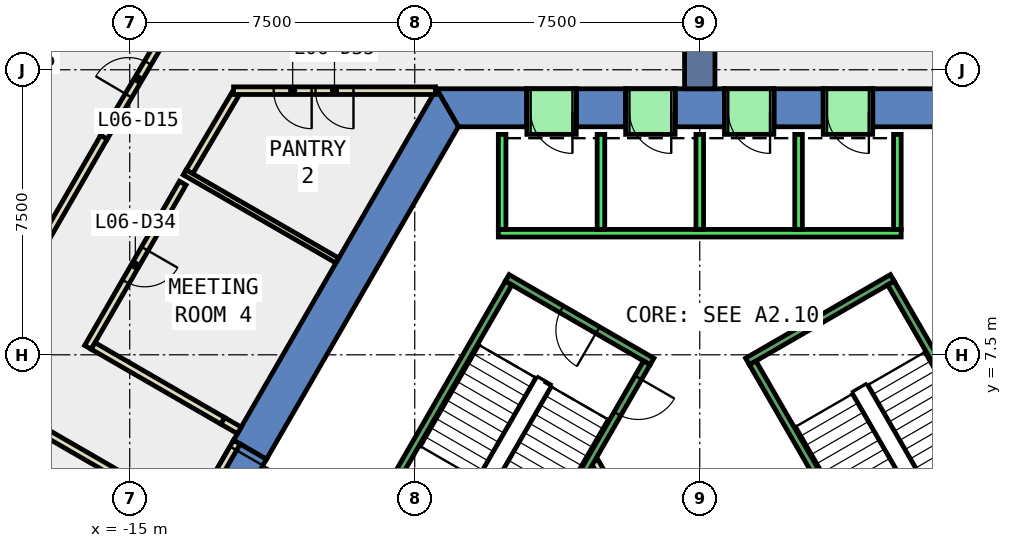
"""IFC4 building model, lengths in metres.
Left out: names, types, materials, properties, quantities, classifications, styles, units other than length and angle.
Written with IfcOpenShell. Run it as: python <this file> out.ifc"""

import sys

from ifc_helpers import new_model, si_unit, direction, frame, frame_2d, origin, place, context, subcontext, project, spatial, polyline, rectangle, outline, extrude, element, fill, save


model = new_model("IFC4")
c1 = context("Model", 3, precision=1e-05, world=origin(), true_north=direction((0.0, 1.0)))
c2 = subcontext(c1, "Body", "Model", "MODEL_VIEW")
j1 = project(units=[si_unit("LENGTHUNIT", "METRE"), si_unit("PLANEANGLEUNIT", "RADIAN")], contexts=[c1])
p1 = place(None, origin())
s1 = spatial("IfcSite", under=j1, at=p1, CompositionType="ELEMENT")
p2 = place(p1, origin())
s2 = spatial("IfcBuilding", under=s1, at=p2, CompositionType="ELEMENT")
p3 = place(p2, frame((0.0, 0.0, 35.0)))
s3 = spatial("IfcBuildingStorey", under=s2, at=p3, CompositionType="ELEMENT", Elevation=35.0)
p4 = place(p3, frame((0.0, 0.0, -0.6)))
e1 = element("IfcWall", 1, at=p4, inside=s3, PredefinedType="SHEAR", context=c2, shape_type="SweptSolid", body=[
    extrude(outline(polyline([(4.55, 14.5), (4.55, 13.5), (6.351, 13.5), (6.928, 14.5), (4.55, 14.5)])), origin(), (0.0, 0.0, 1.0), 4.4),
])
p5 = place(p3, frame((0.0, 0.0, -0.6)))
e2 = element("IfcWall", 2, at=p5, inside=s3, PredefinedType="SHEAR", context=c2, shape_type="SweptSolid", body=[
    extrude(outline(polyline([(1.95, 14.5), (1.95, 13.5), (3.25, 13.5), (3.25, 14.5), (1.95, 14.5)])), origin(), (0.0, 0.0, 1.0), 4.4),
])
p6 = place(p3, frame((0.0, 0.0, -0.6)))
e3 = element("IfcWall", 3, at=p6, inside=s3, PredefinedType="SHEAR", context=c2, shape_type="SweptSolid", body=[
    extrude(outline(polyline([(-0.65, 14.5), (-0.65, 13.5), (0.65, 13.5), (0.65, 14.5), (-0.65, 14.5)])), origin(), (0.0, 0.0, 1.0), 4.4),
])
p7 = place(p3, frame((0.0, 0.0, -0.6)))
e4 = element("IfcWall", 4, at=p7, inside=s3, PredefinedType="SHEAR", context=c2, shape_type="SweptSolid", body=[
    extrude(outline(polyline([(-3.25, 14.5), (-3.25, 13.5), (-1.95, 13.5), (-1.95, 14.5), (-3.25, 14.5)])), origin(), (0.0, 0.0, 1.0), 4.4),
])
p8 = place(p3, frame((0.0, 0.0, -0.6)))
e5 = element("IfcWall", 5, at=p8, inside=s3, PredefinedType="SHEAR", context=c2, shape_type="SweptSolid", body=[
    extrude(outline(polyline([(-4.55, 13.5), (-4.55, 14.5), (-6.928, 14.5), (-6.351, 13.5), (-4.55, 13.5)])), origin(), (0.0, 0.0, 1.0), 4.4),
])
p9 = place(p3, frame((0.0, 0.0, 3.6)))
e6 = element("IfcWall", 6, at=p9, inside=s3, PredefinedType="SHEAR", context=c2, shape_type="SweptSolid", body=[
    extrude(outline(polyline([(3.25, 14.5), (3.25, 13.5), (4.55, 13.5), (4.55, 14.5), (3.25, 14.5)])), origin(), (0.0, 0.0, 1.0), 0.2),
])
p10 = place(p3, frame((0.0, 0.0, 3.6)))
e7 = element("IfcWall", 7, at=p10, inside=s3, PredefinedType="SHEAR", context=c2, shape_type="SweptSolid", body=[
    extrude(outline(polyline([(0.65, 14.5), (0.65, 13.5), (1.95, 13.5), (1.95, 14.5), (0.65, 14.5)])), origin(), (0.0, 0.0, 1.0), 0.2),
])
p11 = place(p3, frame((0.0, 0.0, 3.6)))
e8 = element("IfcWall", 8, at=p11, inside=s3, PredefinedType="SHEAR", context=c2, shape_type="SweptSolid", body=[
    extrude(outline(polyline([(-1.95, 14.5), (-1.95, 13.5), (-0.65, 13.5), (-0.65, 14.5), (-1.95, 14.5)])), origin(), (0.0, 0.0, 1.0), 0.2),
])
p12 = place(p3, frame((0.0, 0.0, 3.6)))
e9 = element("IfcWall", 9, at=p12, inside=s3, PredefinedType="SHEAR", context=c2, shape_type="SweptSolid", body=[
    extrude(outline(polyline([(-4.55, 14.5), (-4.55, 13.5), (-3.25, 13.5), (-3.25, 14.5), (-4.55, 14.5)])), origin(), (0.0, 0.0, 1.0), 0.2),
])
p13 = place(p3, frame((0.0, 0.0, -0.6)))
e10 = element("IfcWall", 10, at=p13, inside=s3, PredefinedType="SHEAR", context=c2, shape_type="SweptSolid", body=[
    extrude(outline(polyline([(-12.267, 5.252), (-11.402, 4.752), (-6.351, 13.5), (-6.928, 14.5), (-12.267, 5.252)])), origin(), (0.0, 0.0, 1.0), 4.4),
])
p14 = place(p3, frame((0.0, 0.0, 3.6)))
e11 = element("IfcWall", 11, at=p14, inside=s3, PredefinedType="SHEAR", context=c2, shape_type="SweptSolid", body=[
    extrude(outline(polyline([(-13.267, 3.52), (-12.402, 3.02), (-11.402, 4.752), (-12.267, 5.252), (-13.267, 3.52)])), origin(), (0.0, 0.0, 1.0), 0.2),
])
p15 = place(p3, frame((0.0, 14.5, -0.6), z_axis=(0.0, 0.0, 1.0), x_axis=(0.0, 1.0, 0.0)))
e12 = element("IfcWall", 12, at=p15, inside=s3, PredefinedType="SHEAR", context=c2, shape_type="SweptSolid", body=[
    extrude(rectangle(XDim=9.0, YDim=0.8, at=frame_2d((4.5, 0.0))), origin(), (0.0, 0.0, 1.0), 4.4),
])
p16 = place(p3, frame((-13.606, 12.016, 0.0), z_axis=(0.0, 0.0, 1.0), x_axis=(-0.499992180995, -0.866029918042, 0.0)))
e13 = element("IfcWall", 13, at=p16, inside=s3, PredefinedType="PARTITIONING", context=c2, shape_type="SweptSolid", body=[
    extrude(rectangle(XDim=4.988, YDim=0.2, at=frame_2d((2.494, 0.0))), origin(), (0.0, 0.0, 1.0), 3.8),
])
p17 = place(p16, frame((1.994, 0.0, 0.0)))
e14 = element("IfcOpeningElement", 14, at=p17, cuts=e13, PredefinedType="OPENING", context=c2, shape_type="SweptSolid", body=[
    extrude(rectangle(XDim=1.0, YDim=2.1, at=frame_2d((0.5, 1.05))), frame((0.0, 0.11, 0.0), z_axis=(0.0, -1.0, 0.0), x_axis=(1.0, 0.0, 0.0)), (0.0, 0.0, 1.0), 0.22),
])
p18 = place(p3, frame((-15.963, 7.733, 0.0), z_axis=(0.0, 0.0, 1.0), x_axis=(0.865965832374, -0.500103166518, 0.0)))
e15 = element("IfcWall", 15, at=p18, inside=s3, PredefinedType="PARTITIONING", context=c2, shape_type="SweptSolid", body=[
    extrude(rectangle(XDim=3.941, YDim=0.2, at=frame_2d((1.971, 0.0))), origin(), (0.0, 0.0, 1.0), 3.8),
])
p19 = place(p3, frame((-12.218, 14.364, 0.0), z_axis=(0.0, 0.0, 1.0), x_axis=(-0.508767325294, -0.860904064756, 0.0)))
e16 = element("IfcWall", 16, at=p19, inside=s3, PredefinedType="PARTITIONING", context=c2, shape_type="SweptSolid", body=[
    extrude(rectangle(XDim=2.38, YDim=0.2, at=frame_2d((1.19, 0.0))), origin(), (0.0, 0.0, 1.0), 3.8),
])
p20 = place(p3, frame((-17.261, 5.48, 0.0), z_axis=(0.0, 0.0, 1.0), x_axis=(0.865949187497, -0.500131987253, 0.0)))
e17 = element("IfcWall", 17, at=p20, inside=s3, PredefinedType="PARTITIONING", context=c2, shape_type="SweptSolid", body=[
    extrude(rectangle(XDim=3.939, YDim=0.2, at=frame_2d((1.969, 0.0))), origin(), (0.0, 0.0, 1.0), 3.8),
])
p21 = place(p3, frame((-17.448, 10.16, 0.0), z_axis=(0.0, 0.0, 1.0), x_axis=(0.499951278228, 0.866053531485, 0.0)))
e18 = element("IfcWall", 18, at=p21, inside=s3, PredefinedType="PARTITIONING", context=c2, shape_type="SweptSolid", body=[
    extrude(rectangle(XDim=3.54, YDim=0.2, at=frame_2d((1.77, 0.0))), origin(), (0.0, 0.0, 1.0), 3.8),
])
p22 = place(p3, frame((-15.678, 13.226, 0.0), z_axis=(0.0, 0.0, 1.0), x_axis=(0.508613166028, 0.860995149431, 0.0)))
e19 = element("IfcWall", 19, at=p22, inside=s3, PredefinedType="PARTITIONING", context=c2, shape_type="SweptSolid", body=[
    extrude(rectangle(XDim=3.541, YDim=0.2, at=frame_2d((1.771, 0.0))), origin(), (0.0, 0.0, 1.0), 3.8),
])
p23 = place(p22, frame((1.271, 0.0, 0.0)))
e20 = element("IfcOpeningElement", 20, at=p23, cuts=e19, PredefinedType="OPENING", context=c2, shape_type="SweptSolid", body=[
    extrude(rectangle(XDim=1.0, YDim=2.1, at=frame_2d((0.5, 1.05))), frame((0.0, 0.11, 0.0), z_axis=(0.0, -1.0, 0.0), x_axis=(1.0, 0.0, 0.0)), (0.0, 0.0, 1.0), 0.22),
])
p24 = place(p3, frame((-13.554, 12.3, 0.0), z_axis=(0.0, 0.0, 1.0), x_axis=(0.866028685375, -0.499994316075, 0.0)))
e21 = element("IfcWall", 21, at=p24, inside=s3, PredefinedType="PARTITIONING", context=c2, shape_type="SweptSolid", body=[
    extrude(rectangle(XDim=4.638, YDim=0.15, at=frame_2d((2.319, 0.0))), origin(), (0.0, 0.0, 1.0), 3.8),
])
p25 = place(p3, frame((-6.957, 14.45, 0.0), z_axis=(0.0, 0.0, 1.0), x_axis=(-1.0, 0.0, 0.0)))
e22 = element("IfcWall", 22, at=p25, inside=s3, PredefinedType="PARTITIONING", context=c2, shape_type="SweptSolid", body=[
    extrude(rectangle(XDim=5.31, YDim=0.2, at=frame_2d((2.655, 0.0))), origin(), (0.0, 0.0, 1.0), 3.8),
])
p26 = place(p25, frame((2.155, 0.0, 0.0)))
e23 = element("IfcOpeningElement", 23, at=p26, cuts=e22, PredefinedType="OPENING", context=c2, shape_type="SweptSolid", body=[
    extrude(rectangle(XDim=1.0, YDim=2.1, at=frame_2d((0.5, 1.05))), frame((0.0, 0.11, 0.0), z_axis=(0.0, -1.0, 0.0), x_axis=(1.0, 0.0, 0.0)), (0.0, 0.0, 1.0), 0.22),
])
p27 = place(p25, frame((3.255, 0.0, 0.0)))
e24 = element("IfcOpeningElement", 24, at=p27, cuts=e22, PredefinedType="OPENING", context=c2, shape_type="SweptSolid", body=[
    extrude(rectangle(XDim=1.0, YDim=2.1, at=frame_2d((0.5, 1.05))), frame((0.0, 0.11, 0.0), z_axis=(0.0, -1.0, 0.0), x_axis=(1.0, 0.0, 0.0)), (0.0, 0.0, 1.0), 0.22),
])
p28 = place(p3, frame((-2.771, 4.7, 0.0), z_axis=(0.0, 0.0, 1.0), x_axis=(0.499969479948, -0.866043023828, 0.0)))
e25 = element("IfcWall", 25, at=p28, inside=s3, PredefinedType="PARTITIONING", context=c2, shape_type="SweptSolid", body=[
    extrude(rectangle(XDim=4.99, YDim=0.2, at=frame_2d((2.495, 0.0))), origin(), (0.0, 0.0, 1.0), 3.8),
])
p29 = place(p28, frame((1.945, 0.0, 0.0)))
e26 = element("IfcOpeningElement", 26, at=p29, cuts=e25, PredefinedType="OPENING", context=c2, shape_type="SweptSolid", body=[
    extrude(rectangle(XDim=1.0, YDim=2.1, at=frame_2d((0.5, 1.05))), frame((0.0, 0.11, 0.0), z_axis=(0.0, -1.0, 0.0), x_axis=(1.0, 0.0, 0.0)), (0.0, 0.0, 1.0), 0.22),
])
p30 = place(p3, frame((-12.18, 5.202, 0.0), z_axis=(0.0, 0.0, 1.0), x_axis=(-0.50002537861, -0.866010750942, 0.0)))
e27 = element("IfcWall", 27, at=p30, inside=s3, PredefinedType="PARTITIONING", context=c2, shape_type="SweptSolid", body=[
    extrude(rectangle(XDim=2.0, YDim=0.2, at=frame_2d((1.0, 0.0))), origin(), (0.0, 0.0, 1.0), 2.4),
])
p31 = place(p30, frame((0.19, 0.0, 0.0)))
e28 = element("IfcOpeningElement", 28, at=p31, cuts=e27, PredefinedType="OPENING", context=c2, shape_type="SweptSolid", body=[
    extrude(rectangle(XDim=1.8, YDim=2.1, at=frame_2d((0.9, 1.05))), frame((0.0, 0.11, 0.0), z_axis=(0.0, -1.0, 0.0), x_axis=(1.0, 0.0, 0.0)), (0.0, 0.0, 1.0), 0.22),
])
p32 = place(p3, frame((-12.55, 5.762, 0.0), z_axis=(0.0, 0.0, 1.0), x_axis=(0.866071776036, -0.499919672301, 0.0)))
e29 = element("IfcWall", 29, at=p32, inside=s3, PredefinedType="PARTITIONING", context=c2, shape_type="SweptSolid", body=[
    extrude(rectangle(XDim=0.5, YDim=0.2, at=frame_2d((0.25, 0.0))), origin(), (0.0, 0.0, 1.0), 2.4),
])
p33 = place(p3, frame((5.3, 10.7, 0.0), z_axis=(0.0, 0.0, 1.0), x_axis=(-1.0, 0.0, 0.0)))
e30 = element("IfcWall", 30, at=p33, inside=s3, PredefinedType="STANDARD", context=c2, shape_type="SweptSolid", body=[
    extrude(rectangle(XDim=10.6, YDim=0.2, at=frame_2d((5.3, 0.0))), origin(), (0.0, 0.0, 1.0), 3.8),
])
for number, where, z_axis, x_axis in (
    (31, (5.2, 10.8, 0.0), (0.0, 0.0, 1.0), (0.0, 1.0, 0.0)),
    (32, (2.6, 10.8, 0.0), (0.0, 0.0, 1.0), (0.0, 1.0, 0.0)),
    (33, (0.0, 10.8, 0.0), (0.0, 0.0, 1.0), (0.0, 1.0, 0.0)),
    (34, (-2.6, 10.8, 0.0), (0.0, 0.0, 1.0), (0.0, 1.0, 0.0)),
    (35, (-5.2, 10.8, 0.0), (0.0, 0.0, 1.0), (0.0, 1.0, 0.0)),
):
    element("IfcWall", number, at=place(p3, frame(where, z_axis=z_axis, x_axis=x_axis)), inside=s3, PredefinedType="STANDARD", context=c2, shape_type="SweptSolid", body=[
        extrude(rectangle(XDim=2.5, YDim=0.2, at=frame_2d((1.25, 0.0))), origin(), (0.0, 0.0, 1.0), 3.8),
    ])
p34 = place(p3, frame((4.55, 13.9, 0.0), z_axis=(0.0, 0.0, 1.0), x_axis=(-1.0, 0.0, 0.0)))
e36 = element("IfcWall", 36, at=p34, inside=s3, PredefinedType="STANDARD", context=c2, shape_type="SweptSolid", body=[
    extrude(rectangle(XDim=1.3, YDim=1.2, at=frame_2d((0.65, 0.0))), origin(), (0.0, 0.0, 1.0), 2.4),
])
p35 = place(p34, frame((0.1, 0.0, 0.0)))
e37 = element("IfcOpeningElement", 37, at=p35, cuts=e36, PredefinedType="OPENING", context=c2, shape_type="SweptSolid", body=[
    extrude(rectangle(XDim=1.1, YDim=2.3, at=frame_2d((0.55, 1.15))), frame((0.0, 0.61, 0.0), z_axis=(0.0, -1.0, 0.0), x_axis=(1.0, 0.0, 0.0)), (0.0, 0.0, 1.0), 1.22),
])
p36 = place(p3, frame((1.95, 13.9, 0.0), z_axis=(0.0, 0.0, 1.0), x_axis=(-1.0, 0.0, 0.0)))
e38 = element("IfcWall", 38, at=p36, inside=s3, PredefinedType="STANDARD", context=c2, shape_type="SweptSolid", body=[
    extrude(rectangle(XDim=1.3, YDim=1.2, at=frame_2d((0.65, 0.0))), origin(), (0.0, 0.0, 1.0), 2.4),
])
p37 = place(p36, frame((0.1, 0.0, 0.0)))
e39 = element("IfcOpeningElement", 39, at=p37, cuts=e38, PredefinedType="OPENING", context=c2, shape_type="SweptSolid", body=[
    extrude(rectangle(XDim=1.1, YDim=2.3, at=frame_2d((0.55, 1.15))), frame((0.0, 0.61, 0.0), z_axis=(0.0, -1.0, 0.0), x_axis=(1.0, 0.0, 0.0)), (0.0, 0.0, 1.0), 1.22),
])
p38 = place(p3, frame((-0.65, 13.9, 0.0), z_axis=(0.0, 0.0, 1.0), x_axis=(-1.0, 0.0, 0.0)))
e40 = element("IfcWall", 40, at=p38, inside=s3, PredefinedType="STANDARD", context=c2, shape_type="SweptSolid", body=[
    extrude(rectangle(XDim=1.3, YDim=1.2, at=frame_2d((0.65, 0.0))), origin(), (0.0, 0.0, 1.0), 2.4),
])
p39 = place(p38, frame((0.1, 0.0, 0.0)))
e41 = element("IfcOpeningElement", 41, at=p39, cuts=e40, PredefinedType="OPENING", context=c2, shape_type="SweptSolid", body=[
    extrude(rectangle(XDim=1.1, YDim=2.3, at=frame_2d((0.55, 1.15))), frame((0.0, 0.61, 0.0), z_axis=(0.0, -1.0, 0.0), x_axis=(1.0, 0.0, 0.0)), (0.0, 0.0, 1.0), 1.22),
])
p40 = place(p3, frame((-3.25, 13.9, 0.0), z_axis=(0.0, 0.0, 1.0), x_axis=(-1.0, 0.0, 0.0)))
e42 = element("IfcWall", 42, at=p40, inside=s3, PredefinedType="STANDARD", context=c2, shape_type="SweptSolid", body=[
    extrude(rectangle(XDim=1.3, YDim=1.2, at=frame_2d((0.65, 0.0))), origin(), (0.0, 0.0, 1.0), 2.4),
])
p41 = place(p40, frame((0.1, 0.0, 0.0)))
e43 = element("IfcOpeningElement", 43, at=p41, cuts=e42, PredefinedType="OPENING", context=c2, shape_type="SweptSolid", body=[
    extrude(rectangle(XDim=1.1, YDim=2.3, at=frame_2d((0.55, 1.15))), frame((0.0, 0.61, 0.0), z_axis=(0.0, -1.0, 0.0), x_axis=(1.0, 0.0, 0.0)), (0.0, 0.0, 1.0), 1.22),
])
p42 = place(p3, frame((1.256, 7.324, 0.0), z_axis=(0.0, 0.0, 1.0), x_axis=(0.866046073146, 0.499964197906, 0.0)))
e44 = element("IfcWall", 44, at=p42, inside=s3, PredefinedType="STANDARD", context=c2, shape_type="SweptSolid", body=[
    extrude(rectangle(XDim=4.4, YDim=0.2, at=frame_2d((2.2, 0.0))), origin(), (0.0, 0.0, 1.0), 3.8),
])
p43 = place(p3, frame((4.843, 1.312, 0.0), z_axis=(0.0, 0.0, 1.0), x_axis=(-0.499963383562, 0.866046543262, 0.0)))
e45 = element("IfcWall", 45, at=p43, inside=s3, PredefinedType="STANDARD", context=c2, shape_type="SweptSolid", body=[
    extrude(rectangle(XDim=6.9, YDim=0.2, at=frame_2d((3.45, 0.0))), origin(), (0.0, 0.0, 1.0), 3.8),
])
p44 = place(p43, frame((0.45, 0.0, 0.0)))
e46 = element("IfcOpeningElement", 46, at=p44, cuts=e45, PredefinedType="OPENING", context=c2, shape_type="SweptSolid", body=[
    extrude(rectangle(XDim=1.1, YDim=2.2, at=frame_2d((0.55, 1.1))), frame((0.0, 0.11, 0.0), z_axis=(0.0, -1.0, 0.0), x_axis=(1.0, 0.0, 0.0)), (0.0, 0.0, 1.0), 0.22),
])
p45 = place(p3, frame((8.48, 3.412, 0.0), z_axis=(0.0, 0.0, 1.0), x_axis=(-0.499978703459, 0.866037698999, 0.0)))
e47 = element("IfcWall", 47, at=p45, inside=s3, PredefinedType="STANDARD", context=c2, shape_type="SweptSolid", body=[
    extrude(rectangle(XDim=6.9, YDim=0.2, at=frame_2d((3.45, 0.0))), origin(), (0.0, 0.0, 1.0), 3.8),
])
p46 = place(p3, frame((-1.256, 7.324, 0.0), z_axis=(0.0, 0.0, 1.0), x_axis=(-0.866046073146, 0.499964197906, 0.0)))
e48 = element("IfcWall", 48, at=p46, inside=s3, PredefinedType="STANDARD", context=c2, shape_type="SweptSolid", body=[
    extrude(rectangle(XDim=4.4, YDim=0.2, at=frame_2d((2.2, 0.0))), origin(), (0.0, 0.0, 1.0), 3.8),
])
p47 = place(p46, frame((1.65, 0.0, 0.0)))
e49 = element("IfcOpeningElement", 49, at=p47, cuts=e48, PredefinedType="OPENING", context=c2, shape_type="SweptSolid", body=[
    extrude(rectangle(XDim=1.1, YDim=2.2, at=frame_2d((0.55, 1.1))), frame((0.0, 0.11, 0.0), z_axis=(0.0, -1.0, 0.0), x_axis=(1.0, 0.0, 0.0)), (0.0, 0.0, 1.0), 0.22),
])
p48 = place(p3, frame((-1.393, 7.288, 0.0), z_axis=(0.0, 0.0, 1.0), x_axis=(-0.499963383562, -0.866046543262, 0.0)))
e50 = element("IfcWall", 50, at=p48, inside=s3, PredefinedType="STANDARD", context=c2, shape_type="SweptSolid", body=[
    extrude(rectangle(XDim=6.9, YDim=0.2, at=frame_2d((3.45, 0.0))), origin(), (0.0, 0.0, 1.0), 3.8),
])
p49 = place(p48, frame((0.45, 0.0, 0.0)))
e51 = element("IfcOpeningElement", 51, at=p49, cuts=e50, PredefinedType="OPENING", context=c2, shape_type="SweptSolid", body=[
    extrude(rectangle(XDim=1.1, YDim=2.2, at=frame_2d((0.55, 1.1))), frame((0.0, 0.11, 0.0), z_axis=(0.0, -1.0, 0.0), x_axis=(1.0, 0.0, 0.0)), (0.0, 0.0, 1.0), 0.22),
])
p50 = place(p3, frame((-5.03, 9.388, 0.0), z_axis=(0.0, 0.0, 1.0), x_axis=(-0.499978703459, -0.866037698999, 0.0)))
e52 = element("IfcWall", 52, at=p50, inside=s3, PredefinedType="STANDARD", context=c2, shape_type="SweptSolid", body=[
    extrude(rectangle(XDim=6.9, YDim=0.2, at=frame_2d((3.45, 0.0))), origin(), (0.0, 0.0, 1.0), 3.8),
])
p51 = place(p23, origin())
e53 = element("IfcDoor", 53, at=p51, inside=s3, OperationType="SINGLE_SWING_LEFT", PredefinedType="DOOR", context=c2, shape_type="SweptSolid", body=[
    extrude(rectangle(XDim=1.0, YDim=2.1, at=frame_2d((0.5, 1.05))), frame((0.0, 0.025, 0.0), z_axis=(0.0, -1.0, 0.0), x_axis=(1.0, 0.0, 0.0)), (0.0, 0.0, 1.0), 0.05),
])
fill(e20, e53)
p52 = place(p17, origin())
e54 = element("IfcDoor", 54, at=p52, inside=s3, OperationType="SINGLE_SWING_LEFT", PredefinedType="DOOR", context=c2, shape_type="SweptSolid", body=[
    extrude(rectangle(XDim=1.0, YDim=2.1, at=frame_2d((0.5, 1.05))), frame((0.0, 0.025, 0.0), z_axis=(0.0, -1.0, 0.0), x_axis=(1.0, 0.0, 0.0)), (0.0, 0.0, 1.0), 0.05),
])
fill(e14, e54)
p53 = place(p26, origin())
e55 = element("IfcDoor", 55, at=p53, inside=s3, OperationType="SINGLE_SWING_LEFT", PredefinedType="DOOR", context=c2, shape_type="SweptSolid", body=[
    extrude(rectangle(XDim=1.0, YDim=2.1, at=frame_2d((0.5, 1.05))), frame((0.0, 0.025, 0.0), z_axis=(0.0, -1.0, 0.0), x_axis=(1.0, 0.0, 0.0)), (0.0, 0.0, 1.0), 0.05),
])
fill(e23, e55)
p54 = place(p27, origin())
e56 = element("IfcDoor", 56, at=p54, inside=s3, OperationType="SINGLE_SWING_RIGHT", PredefinedType="DOOR", context=c2, shape_type="SweptSolid", body=[
    extrude(rectangle(XDim=1.0, YDim=2.1, at=frame_2d((0.5, 1.05))), frame((0.0, 0.025, 0.0), z_axis=(0.0, -1.0, 0.0), x_axis=(1.0, 0.0, 0.0)), (0.0, 0.0, 1.0), 0.05),
])
fill(e24, e56)
p55 = place(p31, origin())
e57 = element("IfcDoor", 57, at=p55, inside=s3, OperationType="DOUBLE_DOOR_SINGLE_SWING", PredefinedType="DOOR", context=c2, shape_type="SweptSolid", body=[
    extrude(rectangle(XDim=1.8, YDim=2.1, at=frame_2d((0.9, 1.05))), frame((0.0, 0.025, 0.0), z_axis=(0.0, -1.0, 0.0), x_axis=(1.0, 0.0, 0.0)), (0.0, 0.0, 1.0), 0.05),
])
fill(e28, e57)
p56 = place(p35, origin())
e58 = element("IfcDoor", 58, at=p56, inside=s3, OperationType="SLIDING_TO_LEFT", PredefinedType="DOOR", context=c2, shape_type="SweptSolid", body=[
    extrude(rectangle(XDim=1.1, YDim=2.3, at=frame_2d((0.55, 1.15))), frame((0.0, 0.025, 0.0), z_axis=(0.0, -1.0, 0.0), x_axis=(1.0, 0.0, 0.0)), (0.0, 0.0, 1.0), 0.05),
])
fill(e37, e58)
p57 = place(p37, origin())
e59 = element("IfcDoor", 59, at=p57, inside=s3, OperationType="SLIDING_TO_LEFT", PredefinedType="DOOR", context=c2, shape_type="SweptSolid", body=[
    extrude(rectangle(XDim=1.1, YDim=2.3, at=frame_2d((0.55, 1.15))), frame((0.0, 0.025, 0.0), z_axis=(0.0, -1.0, 0.0), x_axis=(1.0, 0.0, 0.0)), (0.0, 0.0, 1.0), 0.05),
])
fill(e39, e59)
p58 = place(p39, origin())
e60 = element("IfcDoor", 60, at=p58, inside=s3, OperationType="SLIDING_TO_LEFT", PredefinedType="DOOR", context=c2, shape_type="SweptSolid", body=[
    extrude(rectangle(XDim=1.1, YDim=2.3, at=frame_2d((0.55, 1.15))), frame((0.0, 0.025, 0.0), z_axis=(0.0, -1.0, 0.0), x_axis=(1.0, 0.0, 0.0)), (0.0, 0.0, 1.0), 0.05),
])
fill(e41, e60)
p59 = place(p41, origin())
e61 = element("IfcDoor", 61, at=p59, inside=s3, OperationType="SLIDING_TO_LEFT", PredefinedType="DOOR", context=c2, shape_type="SweptSolid", body=[
    extrude(rectangle(XDim=1.1, YDim=2.3, at=frame_2d((0.55, 1.15))), frame((0.0, 0.025, 0.0), z_axis=(0.0, -1.0, 0.0), x_axis=(1.0, 0.0, 0.0)), (0.0, 0.0, 1.0), 0.05),
])
fill(e43, e61)
p60 = place(p49, origin())
e62 = element("IfcDoor", 62, at=p60, inside=s3, OperationType="SINGLE_SWING_LEFT", PredefinedType="DOOR", context=c2, shape_type="SweptSolid", body=[
    extrude(rectangle(XDim=1.1, YDim=2.2, at=frame_2d((0.55, 1.1))), frame((0.0, 0.025, 0.0), z_axis=(0.0, -1.0, 0.0), x_axis=(1.0, 0.0, 0.0)), (0.0, 0.0, 1.0), 0.05),
])
fill(e51, e62)
p61 = place(p47, origin())
e63 = element("IfcDoor", 63, at=p61, inside=s3, OperationType="SINGLE_SWING_LEFT", PredefinedType="DOOR", context=c2, shape_type="SweptSolid", body=[
    extrude(rectangle(XDim=1.1, YDim=2.2, at=frame_2d((0.55, 1.1))), frame((0.0, 0.025, 0.0), z_axis=(0.0, -1.0, 0.0), x_axis=(1.0, 0.0, 0.0)), (0.0, 0.0, 1.0), 0.05),
])
fill(e49, e63)
save(model, sys.argv[1])
